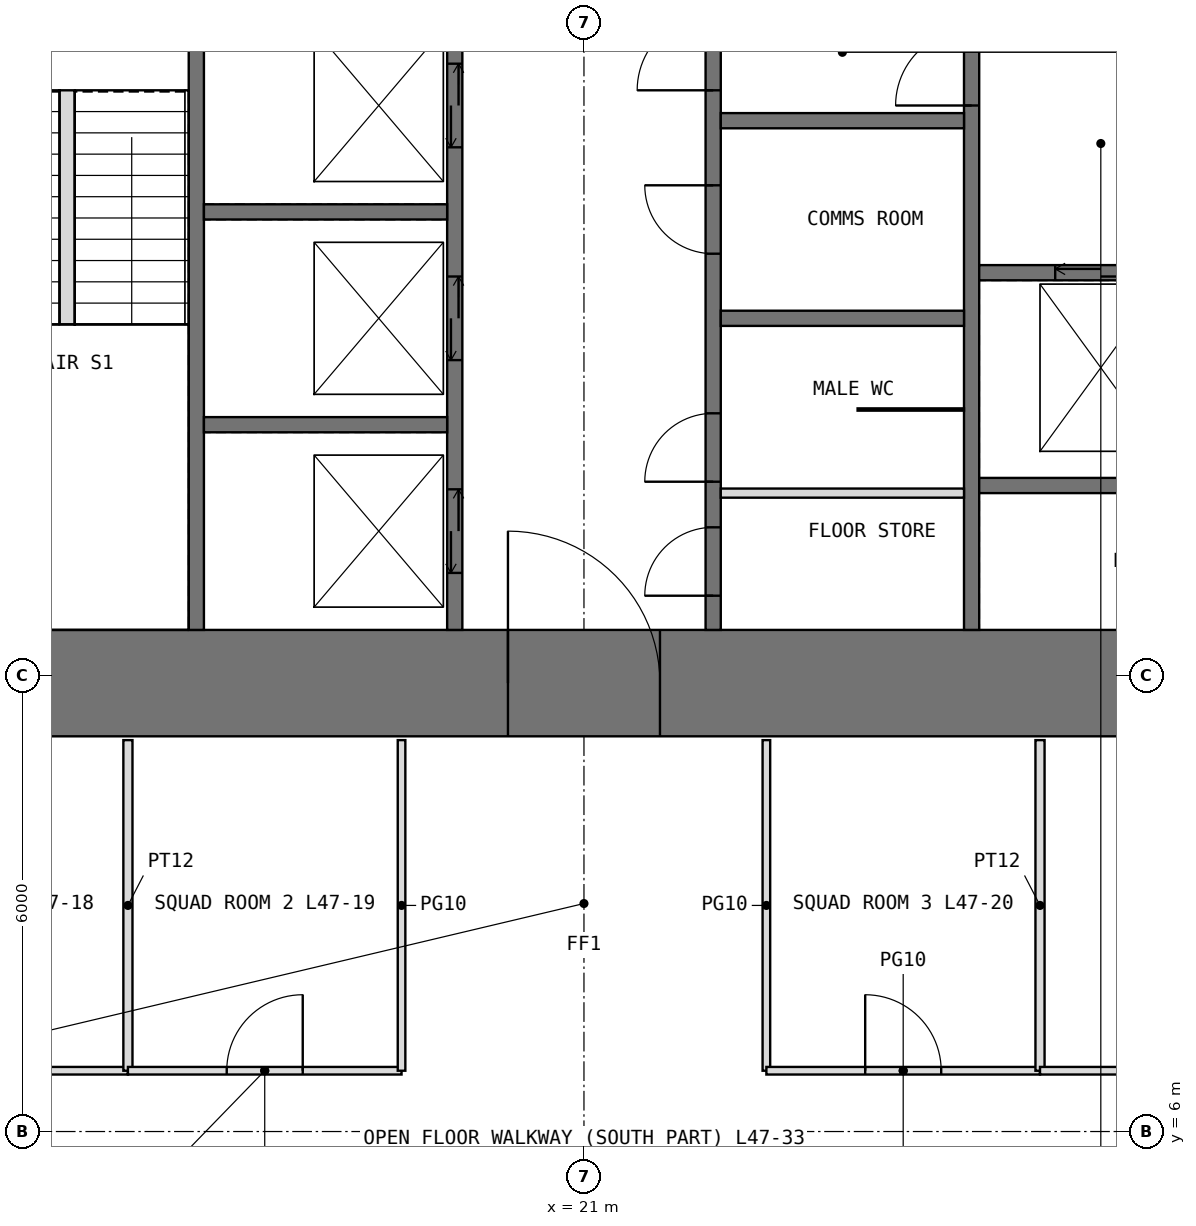
"""IFC4 building model, lengths in metres.
Left out: names, types, materials, properties, quantities, classifications, styles, units other than length and angle.
Written with IfcOpenShell. Run it as: python <this file> out.ifc"""

import sys

from ifc_helpers import new_model, si_unit, direction, frame, frame_2d, origin, place, context, subcontext, project, spatial, rectangle, extrude, element, fill, save


model = new_model("IFC4")
c1 = context("Model", 3, precision=1e-05, world=origin(), true_north=direction((0.0, 1.0)))
c2 = subcontext(c1, "Body", "Model", "MODEL_VIEW")
j1 = project(units=[si_unit("LENGTHUNIT", "METRE"), si_unit("PLANEANGLEUNIT", "RADIAN")], contexts=[c1])
p1 = place(None, origin())
s1 = spatial("IfcSite", under=j1, at=p1, CompositionType="ELEMENT")
p2 = place(p1, origin())
s2 = spatial("IfcBuilding", under=s1, at=p2, CompositionType="ELEMENT")
p3 = place(p2, frame((0.0, 0.0, 198.5)))
s3 = spatial("IfcBuildingStorey", under=s2, at=p3, CompositionType="ELEMENT", Elevation=198.5)
p4 = place(p3, frame((11.2, 11.9, -0.05), z_axis=(0.0, 0.0, 1.0), x_axis=(1.0, 0.0, 0.0)))
e1 = element("IfcWall", 1, at=p4, inside=s3, PredefinedType="SHEAR", context=c2, shape_type="SweptSolid", body=[
    extrude(rectangle(XDim=19.6, YDim=1.4, at=frame_2d((9.8, 0.0))), origin(), (0.0, 0.0, 1.0), 4.0),
])
p5 = place(p4, frame((8.8, 0.0, 0.05)))
e2 = element("IfcOpeningElement", 2, at=p5, cuts=e1, PredefinedType="OPENING", context=c2, shape_type="SweptSolid", body=[
    extrude(rectangle(XDim=2.0, YDim=2.2, at=frame_2d((1.0, 1.1))), frame((0.0, 0.71, 0.0), z_axis=(0.0, -1.0, 0.0), x_axis=(1.0, 0.0, 0.0)), (0.0, 0.0, 1.0), 1.42),
])
p6 = place(p3, frame((15.9, 12.6, -0.05), z_axis=(0.0, 0.0, 1.0), x_axis=(0.0, 1.0, 0.0)))
e3 = element("IfcWall", 3, at=p6, inside=s3, PredefinedType="SHEAR", context=c2, shape_type="SweptSolid", body=[
    extrude(rectangle(XDim=16.8, YDim=0.2, at=frame_2d((8.4, 0.0))), origin(), (0.0, 0.0, 1.0), 4.0),
])
p7 = place(p6, frame((8.9, 0.0, 0.05)))
e4 = element("IfcOpeningElement", 4, at=p7, cuts=e3, PredefinedType="OPENING", context=c2, shape_type="SweptSolid", body=[
    extrude(rectangle(XDim=1.0, YDim=2.2, at=frame_2d((0.5, 1.1))), frame((0.0, 0.11, 0.0), z_axis=(0.0, -1.0, 0.0), x_axis=(1.0, 0.0, 0.0)), (0.0, 0.0, 1.0), 0.22),
])
p8 = place(p3, frame((19.3, 12.6, -0.05), z_axis=(0.0, 0.0, 1.0), x_axis=(0.0, 1.0, 0.0)))
e5 = element("IfcWall", 5, at=p8, inside=s3, PredefinedType="SHEAR", context=c2, shape_type="SweptSolid", body=[
    extrude(rectangle(XDim=16.8, YDim=0.2, at=frame_2d((8.4, 0.0))), origin(), (0.0, 0.0, 1.0), 4.0),
])
p9 = place(p8, frame((8.7, 0.0, 0.05)))
e6 = element("IfcOpeningElement", 6, at=p9, cuts=e5, PredefinedType="OPENING", context=c2, shape_type="SweptSolid", body=[
    extrude(rectangle(XDim=1.0, YDim=2.2, at=frame_2d((0.5, 1.1))), frame((0.0, 0.11, 0.0), z_axis=(0.0, -1.0, 0.0), x_axis=(1.0, 0.0, 0.0)), (0.0, 0.0, 1.0), 0.22),
])
p10 = place(p8, frame((10.85, 0.0, 0.05)))
e7 = element("IfcOpeningElement", 7, at=p10, cuts=e5, PredefinedType="OPENING", context=c2, shape_type="SweptSolid", body=[
    extrude(rectangle(XDim=0.9, YDim=2.2, at=frame_2d((0.45, 1.1))), frame((0.0, 0.11, 0.0), z_axis=(0.0, -1.0, 0.0), x_axis=(1.0, 0.0, 0.0)), (0.0, 0.0, 1.0), 0.22),
])
p11 = place(p8, frame((13.3, 0.0, 0.05)))
e8 = element("IfcOpeningElement", 8, at=p11, cuts=e5, PredefinedType="OPENING", context=c2, shape_type="SweptSolid", body=[
    extrude(rectangle(XDim=1.0, YDim=2.2, at=frame_2d((0.5, 1.1))), frame((0.0, 0.11, 0.0), z_axis=(0.0, -1.0, 0.0), x_axis=(1.0, 0.0, 0.0)), (0.0, 0.0, 1.0), 0.22),
])
p12 = place(p8, frame((15.55, 0.0, 0.05)))
e9 = element("IfcOpeningElement", 9, at=p12, cuts=e5, PredefinedType="OPENING", context=c2, shape_type="SweptSolid", body=[
    extrude(rectangle(XDim=0.9, YDim=2.2, at=frame_2d((0.45, 1.1))), frame((0.0, 0.11, 0.0), z_axis=(0.0, -1.0, 0.0), x_axis=(1.0, 0.0, 0.0)), (0.0, 0.0, 1.0), 0.22),
])
p13 = place(p8, frame((0.75, 0.0, 0.05)))
e10 = element("IfcOpeningElement", 10, at=p13, cuts=e5, PredefinedType="OPENING", context=c2, shape_type="SweptSolid", body=[
    extrude(rectangle(XDim=1.1, YDim=2.2, at=frame_2d((0.55, 1.1))), frame((0.0, 0.11, 0.0), z_axis=(0.0, -1.0, 0.0), x_axis=(1.0, 0.0, 0.0)), (0.0, 0.0, 1.0), 0.22),
])
p14 = place(p8, frame((3.55, 0.0, 0.05)))
e11 = element("IfcOpeningElement", 11, at=p14, cuts=e5, PredefinedType="OPENING", context=c2, shape_type="SweptSolid", body=[
    extrude(rectangle(XDim=1.1, YDim=2.2, at=frame_2d((0.55, 1.1))), frame((0.0, 0.11, 0.0), z_axis=(0.0, -1.0, 0.0), x_axis=(1.0, 0.0, 0.0)), (0.0, 0.0, 1.0), 0.22),
])
p15 = place(p8, frame((6.35, 0.0, 0.05)))
e12 = element("IfcOpeningElement", 12, at=p15, cuts=e5, PredefinedType="OPENING", context=c2, shape_type="SweptSolid", body=[
    extrude(rectangle(XDim=1.1, YDim=2.2, at=frame_2d((0.55, 1.1))), frame((0.0, 0.11, 0.0), z_axis=(0.0, -1.0, 0.0), x_axis=(1.0, 0.0, 0.0)), (0.0, 0.0, 1.0), 0.22),
])
p16 = place(p3, frame((22.7, 12.6, -0.05), z_axis=(0.0, 0.0, 1.0), x_axis=(0.0, 1.0, 0.0)))
e13 = element("IfcWall", 13, at=p16, inside=s3, PredefinedType="SHEAR", context=c2, shape_type="SweptSolid", body=[
    extrude(rectangle(XDim=16.8, YDim=0.2, at=frame_2d((8.4, 0.0))), origin(), (0.0, 0.0, 1.0), 4.0),
])
p17 = place(p16, frame((0.45, 0.0, 0.05)))
e14 = element("IfcOpeningElement", 14, at=p17, cuts=e13, PredefinedType="OPENING", context=c2, shape_type="SweptSolid", body=[
    extrude(rectangle(XDim=0.9, YDim=2.2, at=frame_2d((0.45, 1.1))), frame((0.0, 0.11, 0.0), z_axis=(0.0, -1.0, 0.0), x_axis=(1.0, 0.0, 0.0)), (0.0, 0.0, 1.0), 0.22),
])
p18 = place(p16, frame((7.1, 0.0, 0.05)))
e15 = element("IfcOpeningElement", 15, at=p18, cuts=e13, PredefinedType="OPENING", context=c2, shape_type="SweptSolid", body=[
    extrude(rectangle(XDim=1.0, YDim=2.2, at=frame_2d((0.5, 1.1))), frame((0.0, 0.11, 0.0), z_axis=(0.0, -1.0, 0.0), x_axis=(1.0, 0.0, 0.0)), (0.0, 0.0, 1.0), 0.22),
])
p19 = place(p16, frame((1.95, 0.0, 0.05)))
e16 = element("IfcOpeningElement", 16, at=p19, cuts=e13, PredefinedType="OPENING", context=c2, shape_type="SweptSolid", body=[
    extrude(rectangle(XDim=0.9, YDim=2.2, at=frame_2d((0.45, 1.1))), frame((0.0, 0.11, 0.0), z_axis=(0.0, -1.0, 0.0), x_axis=(1.0, 0.0, 0.0)), (0.0, 0.0, 1.0), 0.22),
])
p20 = place(p16, frame((4.95, 0.0, 0.05)))
e17 = element("IfcOpeningElement", 17, at=p20, cuts=e13, PredefinedType="OPENING", context=c2, shape_type="SweptSolid", body=[
    extrude(rectangle(XDim=0.9, YDim=2.2, at=frame_2d((0.45, 1.1))), frame((0.0, 0.11, 0.0), z_axis=(0.0, -1.0, 0.0), x_axis=(1.0, 0.0, 0.0)), (0.0, 0.0, 1.0), 0.22),
])
p21 = place(p16, frame((9.4, 0.0, 0.05)))
e18 = element("IfcOpeningElement", 18, at=p21, cuts=e13, PredefinedType="OPENING", context=c2, shape_type="SweptSolid", body=[
    extrude(rectangle(XDim=1.0, YDim=2.2, at=frame_2d((0.5, 1.1))), frame((0.0, 0.11, 0.0), z_axis=(0.0, -1.0, 0.0), x_axis=(1.0, 0.0, 0.0)), (0.0, 0.0, 1.0), 0.22),
])
p22 = place(p16, frame((12.2, 0.0, 0.05)))
e19 = element("IfcOpeningElement", 19, at=p22, cuts=e13, PredefinedType="OPENING", context=c2, shape_type="SweptSolid", body=[
    extrude(rectangle(XDim=1.0, YDim=2.2, at=frame_2d((0.5, 1.1))), frame((0.0, 0.11, 0.0), z_axis=(0.0, -1.0, 0.0), x_axis=(1.0, 0.0, 0.0)), (0.0, 0.0, 1.0), 0.22),
])
p23 = place(p3, frame((26.1, 12.6, -0.05), z_axis=(0.0, 0.0, 1.0), x_axis=(0.0, 1.0, 0.0)))
e20 = element("IfcWall", 20, at=p23, inside=s3, PredefinedType="SHEAR", context=c2, shape_type="SweptSolid", body=[
    extrude(rectangle(XDim=16.8, YDim=0.2, at=frame_2d((8.4, 0.0))), origin(), (0.0, 0.0, 1.0), 4.0),
])
p24 = place(p23, frame((6.9, 0.0, 0.05)))
e21 = element("IfcOpeningElement", 21, at=p24, cuts=e20, PredefinedType="OPENING", context=c2, shape_type="SweptSolid", body=[
    extrude(rectangle(XDim=1.0, YDim=2.2, at=frame_2d((0.5, 1.1))), frame((0.0, 0.11, 0.0), z_axis=(0.0, -1.0, 0.0), x_axis=(1.0, 0.0, 0.0)), (0.0, 0.0, 1.0), 0.22),
])
for number, where, z_axis, x_axis in (
    (22, (16.0, 15.3, -0.05), (0.0, 0.0, 1.0), (1.0, 0.0, 0.0)),
    (23, (16.0, 18.1, -0.05), (0.0, 0.0, 1.0), (1.0, 0.0, 0.0)),
    (24, (22.8, 16.7, -0.05), (0.0, 0.0, 1.0), (1.0, 0.0, 0.0)),
    (25, (22.8, 19.3, -0.05), (0.0, 0.0, 1.0), (1.0, 0.0, 0.0)),
    (26, (26.2, 14.5, -0.05), (0.0, 0.0, 1.0), (1.0, 0.0, 0.0)),
):
    element("IfcWall", number, at=place(p3, frame(where, z_axis=z_axis, x_axis=x_axis)), inside=s3, PredefinedType="SHEAR", context=c2, shape_type="SweptSolid", body=[
        extrude(rectangle(XDim=3.2, YDim=0.2, at=frame_2d((1.6, 0.0))), origin(), (0.0, 0.0, 1.0), 4.0),
    ])
p25 = place(p3, frame((26.2, 17.3, -0.05), z_axis=(0.0, 0.0, 1.0), x_axis=(1.0, 0.0, 0.0)))
e27 = element("IfcWall", 27, at=p25, inside=s3, PredefinedType="SHEAR", context=c2, shape_type="SweptSolid", body=[
    extrude(rectangle(XDim=3.2, YDim=0.2, at=frame_2d((1.6, 0.0))), origin(), (0.0, 0.0, 1.0), 4.0),
])
p26 = place(p25, frame((1.0, 0.0, 0.05)))
e28 = element("IfcOpeningElement", 28, at=p26, cuts=e27, PredefinedType="OPENING", context=c2, shape_type="SweptSolid", body=[
    extrude(rectangle(XDim=1.2, YDim=2.2, at=frame_2d((0.6, 1.1))), frame((0.0, 0.11, 0.0), z_axis=(0.0, -1.0, 0.0), x_axis=(1.0, 0.0, 0.0)), (0.0, 0.0, 1.0), 0.22),
])
p27 = place(p3, frame((22.8, 14.4, 0.0), z_axis=(0.0, 0.0, 1.0), x_axis=(1.0, 0.0, 0.0)))
e29 = element("IfcWall", 29, at=p27, inside=s3, PredefinedType="PARTITIONING", context=c2, shape_type="SweptSolid", body=[
    extrude(rectangle(XDim=3.2, YDim=0.12, at=frame_2d((1.6, 0.0))), origin(), (0.0, 0.0, 1.0), 3.75),
])
p28 = place(p3, frame((24.6, 15.5, 0.0), z_axis=(0.0, 0.0, 1.0), x_axis=(1.0, 0.0, 0.0)))
e30 = element("IfcWall", 30, at=p28, inside=s3, PredefinedType="PARTITIONING", context=c2, shape_type="SweptSolid", body=[
    extrude(rectangle(XDim=1.4, YDim=0.03, at=frame_2d((0.7, 0.0))), origin(), (0.0, 0.0, 1.0), 3.75),
])
p29 = place(p3, frame((11.2, 6.8, 0.0), z_axis=(0.0, 0.0, 1.0), x_axis=(1.0, 0.0, 0.0)))
e31 = element("IfcWall", 31, at=p29, inside=s3, PredefinedType="PARTITIONING", context=c2, shape_type="SweptSolid", body=[
    extrude(rectangle(XDim=3.8, YDim=0.1, at=frame_2d((1.9, 0.0))), origin(), (0.0, 0.0, 1.0), 3.75),
])
p30 = place(p29, frame((1.4, 0.0, 0.0)))
e32 = element("IfcOpeningElement", 32, at=p30, cuts=e31, PredefinedType="OPENING", context=c2, shape_type="SweptSolid", body=[
    extrude(rectangle(XDim=1.0, YDim=2.4, at=frame_2d((0.5, 1.2))), frame((0.0, 0.06, 0.0), z_axis=(0.0, -1.0, 0.0), x_axis=(1.0, 0.0, 0.0)), (0.0, 0.0, 1.0), 0.12),
])
p31 = place(p3, frame((15.0, 6.8, 0.0), z_axis=(0.0, 0.0, 1.0), x_axis=(0.0, 1.0, 0.0)))
e33 = element("IfcWall", 33, at=p31, inside=s3, PredefinedType="PARTITIONING", context=c2, shape_type="SweptSolid", body=[
    extrude(rectangle(XDim=4.35, YDim=0.12, at=frame_2d((2.175, 0.0))), origin(), (0.0, 0.0, 1.0), 3.75),
])
p32 = place(p3, frame((15.0, 6.8, 0.0), z_axis=(0.0, 0.0, 1.0), x_axis=(1.0, 0.0, 0.0)))
e34 = element("IfcWall", 34, at=p32, inside=s3, PredefinedType="PARTITIONING", context=c2, shape_type="SweptSolid", body=[
    extrude(rectangle(XDim=3.6, YDim=0.1, at=frame_2d((1.8, 0.0))), origin(), (0.0, 0.0, 1.0), 3.75),
])
p33 = place(p32, frame((1.3, 0.0, 0.0)))
e35 = element("IfcOpeningElement", 35, at=p33, cuts=e34, PredefinedType="OPENING", context=c2, shape_type="SweptSolid", body=[
    extrude(rectangle(XDim=1.0, YDim=2.4, at=frame_2d((0.5, 1.2))), frame((0.0, 0.06, 0.0), z_axis=(0.0, -1.0, 0.0), x_axis=(1.0, 0.0, 0.0)), (0.0, 0.0, 1.0), 0.12),
])
for number, where, z_axis, x_axis in (
    (36, (18.6, 6.8, 0.0), (0.0, 0.0, 1.0), (0.0, 1.0, 0.0)),
    (37, (23.4, 6.8, 0.0), (0.0, 0.0, 1.0), (0.0, 1.0, 0.0)),
):
    element("IfcWall", number, at=place(p3, frame(where, z_axis=z_axis, x_axis=x_axis)), inside=s3, PredefinedType="PARTITIONING", context=c2, shape_type="SweptSolid", body=[
        extrude(rectangle(XDim=4.35, YDim=0.1, at=frame_2d((2.175, 0.0))), origin(), (0.0, 0.0, 1.0), 3.75),
    ])
p34 = place(p3, frame((23.4, 6.8, 0.0), z_axis=(0.0, 0.0, 1.0), x_axis=(1.0, 0.0, 0.0)))
e38 = element("IfcWall", 38, at=p34, inside=s3, PredefinedType="PARTITIONING", context=c2, shape_type="SweptSolid", body=[
    extrude(rectangle(XDim=3.6, YDim=0.1, at=frame_2d((1.8, 0.0))), origin(), (0.0, 0.0, 1.0), 3.75),
])
p35 = place(p34, frame((1.3, 0.0, 0.0)))
e39 = element("IfcOpeningElement", 39, at=p35, cuts=e38, PredefinedType="OPENING", context=c2, shape_type="SweptSolid", body=[
    extrude(rectangle(XDim=1.0, YDim=2.4, at=frame_2d((0.5, 1.2))), frame((0.0, 0.06, 0.0), z_axis=(0.0, -1.0, 0.0), x_axis=(1.0, 0.0, 0.0)), (0.0, 0.0, 1.0), 0.12),
])
p36 = place(p3, frame((27.0, 6.8, 0.0), z_axis=(0.0, 0.0, 1.0), x_axis=(0.0, 1.0, 0.0)))
e40 = element("IfcWall", 40, at=p36, inside=s3, PredefinedType="PARTITIONING", context=c2, shape_type="SweptSolid", body=[
    extrude(rectangle(XDim=4.35, YDim=0.12, at=frame_2d((2.175, 0.0))), origin(), (0.0, 0.0, 1.0), 3.75),
])
p37 = place(p3, frame((27.0, 6.8, 0.0), z_axis=(0.0, 0.0, 1.0), x_axis=(1.0, 0.0, 0.0)))
e41 = element("IfcWall", 41, at=p37, inside=s3, PredefinedType="PARTITIONING", context=c2, shape_type="SweptSolid", body=[
    extrude(rectangle(XDim=3.8, YDim=0.1, at=frame_2d((1.9, 0.0))), origin(), (0.0, 0.0, 1.0), 3.75),
])
p38 = place(p37, frame((1.4, 0.0, 0.0)))
e42 = element("IfcOpeningElement", 42, at=p38, cuts=e41, PredefinedType="OPENING", context=c2, shape_type="SweptSolid", body=[
    extrude(rectangle(XDim=1.0, YDim=2.4, at=frame_2d((0.5, 1.2))), frame((0.0, 0.06, 0.0), z_axis=(0.0, -1.0, 0.0), x_axis=(1.0, 0.0, 0.0)), (0.0, 0.0, 1.0), 0.12),
])
p39 = place(p3, frame((14.2, 16.62, 0.0), z_axis=(0.0, 0.0, 1.0), x_axis=(0.0, 1.0, 0.0)))
e43 = element("IfcWall", 43, at=p39, inside=s3, PredefinedType="PARTITIONING", context=c2, shape_type="SweptSolid", body=[
    extrude(rectangle(XDim=3.08, YDim=0.2, at=frame_2d((1.54, 0.0))), origin(), (0.0, 0.0, 1.0), 4.0),
])
p40 = place(p5, origin())
e44 = element("IfcDoor", 44, at=p40, inside=s3, OperationType="DOUBLE_DOOR_SINGLE_SWING", PredefinedType="DOOR", context=c2, shape_type="SweptSolid", body=[
    extrude(rectangle(XDim=2.0, YDim=2.2, at=frame_2d((1.0, 1.1))), frame((0.0, 0.025, 0.0), z_axis=(0.0, -1.0, 0.0), x_axis=(1.0, 0.0, 0.0)), (0.0, 0.0, 1.0), 0.05),
])
fill(e2, e44)
p41 = place(p17, origin())
e45 = element("IfcDoor", 45, at=p41, inside=s3, OperationType="SINGLE_SWING_LEFT", PredefinedType="DOOR", context=c2, shape_type="SweptSolid", body=[
    extrude(rectangle(XDim=0.9, YDim=2.2, at=frame_2d((0.45, 1.1))), frame((0.0, 0.025, 0.0), z_axis=(0.0, -1.0, 0.0), x_axis=(1.0, 0.0, 0.0)), (0.0, 0.0, 1.0), 0.05),
])
fill(e14, e45)
p42 = place(p24, origin())
e46 = element("IfcDoor", 46, at=p42, inside=s3, OperationType="SINGLE_SWING_LEFT", PredefinedType="DOOR", context=c2, shape_type="SweptSolid", body=[
    extrude(rectangle(XDim=1.0, YDim=2.2, at=frame_2d((0.5, 1.1))), frame((0.0, 0.025, 0.0), z_axis=(0.0, -1.0, 0.0), x_axis=(1.0, 0.0, 0.0)), (0.0, 0.0, 1.0), 0.05),
])
fill(e21, e46)
p43 = place(p18, origin())
e47 = element("IfcDoor", 47, at=p43, inside=s3, OperationType="SINGLE_SWING_LEFT", PredefinedType="DOOR", context=c2, shape_type="SweptSolid", body=[
    extrude(rectangle(XDim=1.0, YDim=2.2, at=frame_2d((0.5, 1.1))), frame((0.0, 0.025, 0.0), z_axis=(0.0, -1.0, 0.0), x_axis=(1.0, 0.0, 0.0)), (0.0, 0.0, 1.0), 0.05),
])
fill(e15, e47)
p44 = place(p19, origin())
e48 = element("IfcDoor", 48, at=p44, inside=s3, OperationType="SINGLE_SWING_LEFT", PredefinedType="DOOR", context=c2, shape_type="SweptSolid", body=[
    extrude(rectangle(XDim=0.9, YDim=2.2, at=frame_2d((0.45, 1.1))), frame((0.0, 0.025, 0.0), z_axis=(0.0, -1.0, 0.0), x_axis=(1.0, 0.0, 0.0)), (0.0, 0.0, 1.0), 0.05),
])
fill(e16, e48)
p45 = place(p20, origin())
e49 = element("IfcDoor", 49, at=p45, inside=s3, OperationType="SINGLE_SWING_RIGHT", PredefinedType="DOOR", context=c2, shape_type="SweptSolid", body=[
    extrude(rectangle(XDim=0.9, YDim=2.2, at=frame_2d((0.45, 1.1))), frame((0.0, 0.025, 0.0), z_axis=(0.0, -1.0, 0.0), x_axis=(1.0, 0.0, 0.0)), (0.0, 0.0, 1.0), 0.05),
])
fill(e17, e49)
p46 = place(p33, origin())
e50 = element("IfcDoor", 50, at=p46, inside=s3, OperationType="SINGLE_SWING_RIGHT", PredefinedType="DOOR", context=c2, shape_type="SweptSolid", body=[
    extrude(rectangle(XDim=1.0, YDim=2.4, at=frame_2d((0.5, 1.2))), frame((0.0, 0.025, 0.0), z_axis=(0.0, -1.0, 0.0), x_axis=(1.0, 0.0, 0.0)), (0.0, 0.0, 1.0), 0.05),
])
fill(e35, e50)
p47 = place(p35, origin())
e51 = element("IfcDoor", 51, at=p47, inside=s3, OperationType="SINGLE_SWING_LEFT", PredefinedType="DOOR", context=c2, shape_type="SweptSolid", body=[
    extrude(rectangle(XDim=1.0, YDim=2.4, at=frame_2d((0.5, 1.2))), frame((0.0, 0.025, 0.0), z_axis=(0.0, -1.0, 0.0), x_axis=(1.0, 0.0, 0.0)), (0.0, 0.0, 1.0), 0.05),
])
fill(e39, e51)
p48 = place(p13, origin())
e52 = element("IfcDoor", 52, at=p48, inside=s3, OperationType="DOUBLE_DOOR_SLIDING", PredefinedType="DOOR", context=c2, shape_type="SweptSolid", body=[
    extrude(rectangle(XDim=1.1, YDim=2.2, at=frame_2d((0.55, 1.1))), frame((0.0, 0.025, 0.0), z_axis=(0.0, -1.0, 0.0), x_axis=(1.0, 0.0, 0.0)), (0.0, 0.0, 1.0), 0.05),
])
fill(e10, e52)
p49 = place(p14, origin())
e53 = element("IfcDoor", 53, at=p49, inside=s3, OperationType="DOUBLE_DOOR_SLIDING", PredefinedType="DOOR", context=c2, shape_type="SweptSolid", body=[
    extrude(rectangle(XDim=1.1, YDim=2.2, at=frame_2d((0.55, 1.1))), frame((0.0, 0.025, 0.0), z_axis=(0.0, -1.0, 0.0), x_axis=(1.0, 0.0, 0.0)), (0.0, 0.0, 1.0), 0.05),
])
fill(e11, e53)
p50 = place(p15, origin())
e54 = element("IfcDoor", 54, at=p50, inside=s3, OperationType="DOUBLE_DOOR_SLIDING", PredefinedType="DOOR", context=c2, shape_type="SweptSolid", body=[
    extrude(rectangle(XDim=1.1, YDim=2.2, at=frame_2d((0.55, 1.1))), frame((0.0, 0.025, 0.0), z_axis=(0.0, -1.0, 0.0), x_axis=(1.0, 0.0, 0.0)), (0.0, 0.0, 1.0), 0.05),
])
fill(e12, e54)
p51 = place(p26, origin())
e55 = element("IfcDoor", 55, at=p51, inside=s3, OperationType="DOUBLE_DOOR_SLIDING", PredefinedType="DOOR", context=c2, shape_type="SweptSolid", body=[
    extrude(rectangle(XDim=1.2, YDim=2.2, at=frame_2d((0.6, 1.1))), frame((0.0, 0.025, 0.0), z_axis=(0.0, -1.0, 0.0), x_axis=(1.0, 0.0, 0.0)), (0.0, 0.0, 1.0), 0.05),
])
fill(e28, e55)
save(model, sys.argv[1])
